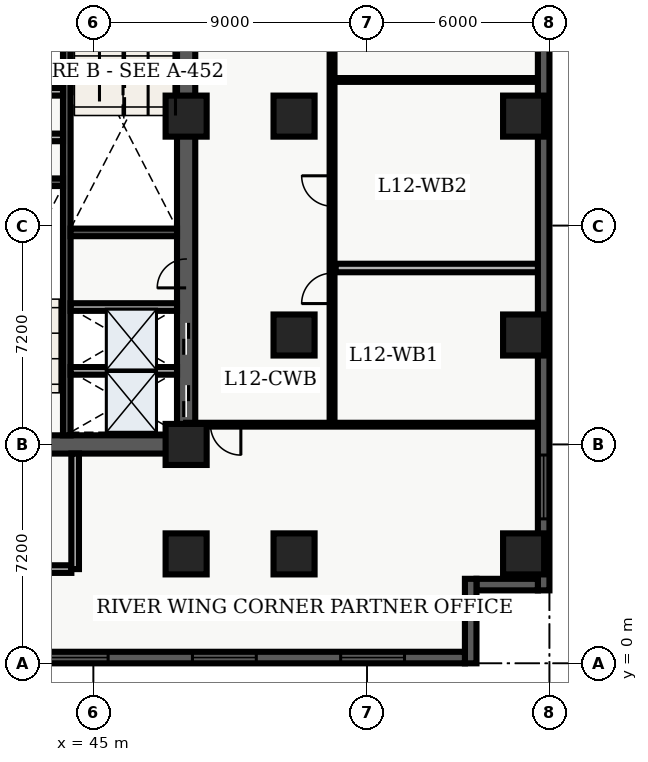
"""IFC4 building model, lengths in metres.
Left out: names, types, materials, properties, quantities, classifications, styles, units other than length and angle.
Written with IfcOpenShell. Run it as: python <this file> out.ifc"""

import sys

from ifc_helpers import new_model, entity, si_unit, converted_unit, direction, frame, origin_with_axes, origin_2d_with_axis, place, context, subcontext, project, spatial, polyline, rectangle, outline, extrude, element, fill, save


model = new_model("IFC4")
c1 = context("Model", 3, precision=1e-05, world=origin_with_axes(), true_north=direction((0.0, 1.0)))
c2 = subcontext(c1, "Body", "Model", "MODEL_VIEW")
j1 = project(units=[si_unit("LENGTHUNIT", "METRE"), converted_unit("PLANEANGLEUNIT", "DEGREE", entity("IfcPlaneAngleMeasure", 0.017), si_unit("PLANEANGLEUNIT", "RADIAN"), dimensions=[0, 0, 0, 0, 0, 0, 0])], contexts=[c1])
p1 = place(None, origin_with_axes())
s1 = spatial("IfcSite", under=j1, at=p1, CompositionType="ELEMENT")
p2 = place(p1, origin_with_axes())
s2 = spatial("IfcBuilding", under=s1, at=p2, CompositionType="ELEMENT")
p3 = place(p2, frame((0.0, 0.0, 52.2), z_axis=(0.0, 0.0, 1.0), x_axis=(1.0, 0.0, 0.0)))
s3 = spatial("IfcBuildingStorey", under=s2, at=p3, CompositionType="ELEMENT", Elevation=52.2)
p4 = place(p3, frame((40.2, 7.2, 0.0), z_axis=(0.0, 0.0, 1.0), x_axis=(1.0, 0.0, 0.0)))
e1 = element("IfcWall", 1, at=p4, inside=s3, PredefinedType="SHEAR", context=c2, shape_type="SweptSolid", body=[
    extrude(outline(polyline([(0.0, -0.3), (7.85, -0.3), (7.85, 0.3), (0.0, 0.3), (0.0, -0.3)])), origin_with_axes(), (0.0, 0.0, 1.0), 3.66),
])
p5 = place(p4, frame((2.175, 0.0, 0.0), z_axis=(0.0, 0.0, 1.0), x_axis=(1.0, 0.0, 0.0)))
e2 = element("IfcOpeningElement", 2, at=p5, cuts=e1, PredefinedType="OPENING", context=c2, shape_type="SweptSolid", body=[
    extrude(rectangle(XDim=1.05, YDim=0.62, at=origin_2d_with_axis()), origin_with_axes(), (0.0, 0.0, 1.0), 2.15),
])
p6 = place(p3, frame((48.05, 7.2, 0.0), z_axis=(0.0, 0.0, 1.0), x_axis=(0.0, 1.0, 0.0)))
e3 = element("IfcWall", 3, at=p6, inside=s3, PredefinedType="SHEAR", context=c2, shape_type="SweptSolid", body=[
    extrude(outline(polyline([(0.0, -0.3), (15.6, -0.3), (15.6, 0.3), (0.0, 0.3), (0.0, -0.3)])), origin_with_axes(), (0.0, 0.0, 1.0), 3.66),
])
p7 = place(p6, frame((1.425, 0.0, 0.0), z_axis=(0.0, 0.0, 1.0), x_axis=(1.0, 0.0, 0.0)))
e4 = element("IfcOpeningElement", 4, at=p7, cuts=e3, PredefinedType="OPENING", context=c2, shape_type="SweptSolid", body=[
    extrude(rectangle(XDim=1.05, YDim=0.62, at=origin_2d_with_axis()), origin_with_axes(), (0.0, 0.0, 1.0), 2.15),
])
p8 = place(p6, frame((3.475, 0.0, 0.0), z_axis=(0.0, 0.0, 1.0), x_axis=(1.0, 0.0, 0.0)))
e5 = element("IfcOpeningElement", 5, at=p8, cuts=e3, PredefinedType="OPENING", context=c2, shape_type="SweptSolid", body=[
    extrude(rectangle(XDim=1.05, YDim=0.62, at=origin_2d_with_axis()), origin_with_axes(), (0.0, 0.0, 1.0), 2.15),
])
p9 = place(p6, frame((5.625, 0.0, 0.0), z_axis=(0.0, 0.0, 1.0), x_axis=(1.0, 0.0, 0.0)))
e6 = element("IfcOpeningElement", 6, at=p9, cuts=e3, PredefinedType="OPENING", context=c2, shape_type="SweptSolid", body=[
    extrude(rectangle(XDim=0.95, YDim=0.62, at=origin_2d_with_axis()), origin_with_axes(), (0.0, 0.0, 1.0), 2.15),
])
p10 = place(p3, frame((44.125, 7.5, 0.0), z_axis=(0.0, 0.0, 1.0), x_axis=(0.0, 1.0, 0.0)))
e7 = element("IfcWall", 7, at=p10, inside=s3, PredefinedType="SHEAR", context=c2, shape_type="SweptSolid", body=[
    extrude(outline(polyline([(0.0, -0.125), (15.0, -0.125), (15.0, 0.125), (0.0, 0.125), (0.0, -0.125)])), origin_with_axes(), (0.0, 0.0, 1.0), 3.66),
])
for number, where, z_axis, x_axis in (
    (8, (40.5, 15.825, 0.0), (0.0, 0.0, 1.0), (1.0, 0.0, 0.0)),
    (9, (44.25, 14.175, 0.0), (0.0, 0.0, 1.0), (1.0, 0.0, 0.0)),
):
    element("IfcWall", number, at=place(p3, frame(where, z_axis=z_axis, x_axis=x_axis)), inside=s3, PredefinedType="SHEAR", context=c2, shape_type="SweptSolid", body=[
        extrude(outline(polyline([(0.0, -0.125), (3.5, -0.125), (3.5, 0.125), (0.0, 0.125), (0.0, -0.125)])), origin_with_axes(), (0.0, 0.0, 1.0), 3.66),
    ])
p11 = place(p3, frame((40.5, 17.3, 0.0), z_axis=(0.0, 0.0, 1.0), x_axis=(1.0, 0.0, 0.0)))
e10 = element("IfcWall", 10, at=p11, inside=s3, PredefinedType="SOLIDWALL", context=c2, shape_type="SweptSolid", body=[
    extrude(outline(polyline([(0.0, -0.125), (3.5, -0.125), (3.5, 0.125), (0.0, 0.125), (0.0, -0.125)])), origin_with_axes(), (0.0, 0.0, 1.0), 2.7),
])
p12 = place(p11, frame((2.4, 0.0, 0.0), z_axis=(0.0, 0.0, 1.0), x_axis=(1.0, 0.0, 0.0)))
e11 = element("IfcOpeningElement", 11, at=p12, cuts=e10, PredefinedType="OPENING", context=c2, shape_type="SweptSolid", body=[
    extrude(rectangle(XDim=0.9, YDim=0.27, at=origin_2d_with_axis()), origin_with_axes(), (0.0, 0.0, 1.0), 2.15),
])
p13 = place(p3, frame((40.5, 18.8, 0.0), z_axis=(0.0, 0.0, 1.0), x_axis=(1.0, 0.0, 0.0)))
e12 = element("IfcWall", 12, at=p13, inside=s3, PredefinedType="SOLIDWALL", context=c2, shape_type="SweptSolid", body=[
    extrude(outline(polyline([(0.0, -0.125), (3.5, -0.125), (3.5, 0.125), (0.0, 0.125), (0.0, -0.125)])), origin_with_axes(), (0.0, 0.0, 1.0), 2.7),
])
p14 = place(p3, frame((40.325, 3.1, 0.0), z_axis=(0.0, 0.0, 1.0), x_axis=(1.0, 0.0, 0.0)))
e13 = element("IfcWall", 13, at=p14, inside=s3, PredefinedType="SOLIDWALL", context=c2, shape_type="SweptSolid", body=[
    extrude(outline(polyline([(0.0, -0.125), (3.95, -0.125), (3.95, 0.125), (0.0, 0.125), (0.0, -0.125)])), origin_with_axes(), (0.0, 0.0, 1.0), 2.7),
])
p15 = place(p3, frame((44.4, 3.1, 0.0), z_axis=(0.0, 0.0, 1.0), x_axis=(0.0, 1.0, 0.0)))
e14 = element("IfcWall", 14, at=p15, inside=s3, PredefinedType="SOLIDWALL", context=c2, shape_type="SweptSolid", body=[
    extrude(outline(polyline([(0.0, -0.125), (3.8, -0.125), (3.8, 0.125), (0.0, 0.125), (0.0, -0.125)])), origin_with_axes(), (0.0, 0.0, 1.0), 2.7),
])
for number, where, z_axis, x_axis in (
    (15, (48.05, 3.6, 0.0), (0.0, 0.0, 1.0), (1.0, 0.0, 0.0)),
    (16, (48.05, 7.2, 0.0), (0.0, 0.0, 1.0), (1.0, 0.0, 0.0)),
    (17, (48.05, 18.0, 0.0), (0.0, 0.0, 1.0), (1.0, 0.0, 0.0)),
    (18, (51.6, 3.6, 0.0), (0.0, 0.0, 1.0), (1.0, 0.0, 0.0)),
    (19, (51.6, 10.8, 0.0), (0.0, 0.0, 1.0), (1.0, 0.0, 0.0)),
    (20, (51.6, 18.0, 0.0), (0.0, 0.0, 1.0), (1.0, 0.0, 0.0)),
    (21, (59.15, 3.6, 0.0), (0.0, 0.0, 1.0), (1.0, 0.0, 0.0)),
    (22, (59.15, 10.8, 0.0), (0.0, 0.0, 1.0), (1.0, 0.0, 0.0)),
    (23, (59.15, 18.0, 0.0), (0.0, 0.0, 1.0), (1.0, 0.0, 0.0)),
):
    element("IfcColumn", number, at=place(p3, frame(where, z_axis=z_axis, x_axis=x_axis)), inside=s3, PredefinedType="COLUMN", context=c2, shape_type="SweptSolid", body=[
        extrude(rectangle(XDim=1.35, YDim=1.35, at=origin_2d_with_axis()), origin_with_axes(), (0.0, 0.0, 1.0), 3.9),
    ])
for number, where, z_axis, x_axis in (
    (24, (44.25, 9.62, 0.0), (0.0, 0.0, 1.0), (1.0, 0.0, 0.0)),
    (25, (44.25, 11.72, 0.0), (0.0, 0.0, 1.0), (1.0, 0.0, 0.0)),
):
    element("IfcWall", number, at=place(p3, frame(where, z_axis=z_axis, x_axis=x_axis)), inside=s3, PredefinedType="SOLIDWALL", context=c2, shape_type="SweptSolid", body=[
        extrude(outline(polyline([(0.0, -0.125), (3.5, -0.125), (3.5, 0.125), (0.0, 0.125), (0.0, -0.125)])), origin_with_axes(), (0.0, 0.0, 1.0), 2.7),
    ])
p16 = place(p3, frame((52.85, 7.85, 0.0), z_axis=(0.0, 0.0, 1.0), x_axis=(0.0, 1.0, 0.0)))
e26 = element("IfcWall", 26, at=p16, inside=s3, PredefinedType="PARTITIONING", context=c2, shape_type="SweptSolid", body=[
    extrude(outline(polyline([(0.0, -0.08), (18.8, -0.08), (18.8, 0.08), (0.0, 0.08), (0.0, -0.08)])), origin_with_axes(), (0.0, 0.0, 1.0), 2.7),
])
p17 = place(p16, frame((4.484, 0.0, 0.0), z_axis=(0.0, 0.0, 1.0), x_axis=(1.0, 0.0, 0.0)))
e27 = element("IfcOpeningElement", 27, at=p17, cuts=e26, PredefinedType="OPENING", context=c2, shape_type="SweptSolid", body=[
    extrude(rectangle(XDim=1.0, YDim=0.18, at=origin_2d_with_axis()), origin_with_axes(), (0.0, 0.0, 1.0), 2.15),
])
p18 = place(p16, frame((7.687, 0.0, 0.0), z_axis=(0.0, 0.0, 1.0), x_axis=(1.0, 0.0, 0.0)))
e28 = element("IfcOpeningElement", 28, at=p18, cuts=e26, PredefinedType="OPENING", context=c2, shape_type="SweptSolid", body=[
    extrude(rectangle(XDim=1.0, YDim=0.18, at=origin_2d_with_axis()), origin_with_axes(), (0.0, 0.0, 1.0), 2.15),
])
p19 = place(p16, frame((13.79, 0.0, 0.0), z_axis=(0.0, 0.0, 1.0), x_axis=(1.0, 0.0, 0.0)))
e29 = element("IfcOpeningElement", 29, at=p19, cuts=e26, PredefinedType="OPENING", context=c2, shape_type="SweptSolid", body=[
    extrude(rectangle(XDim=1.0, YDim=0.18, at=origin_2d_with_axis()), origin_with_axes(), (0.0, 0.0, 1.0), 2.15),
])
p20 = place(p3, frame((59.64, 7.85, 0.0), z_axis=(0.0, 0.0, 1.0), x_axis=(-1.0, 0.0, 0.0)))
e30 = element("IfcWall", 30, at=p20, inside=s3, PredefinedType="PARTITIONING", context=c2, shape_type="SweptSolid", body=[
    extrude(outline(polyline([(0.0, -0.062), (11.59, -0.062), (11.59, 0.062), (0.0, 0.062), (0.0, -0.062)])), origin_with_axes(), (0.0, 0.0, 1.0), 2.7),
])
p21 = place(p20, frame((10.29, 0.0, 0.0), z_axis=(0.0, 0.0, 1.0), x_axis=(1.0, 0.0, 0.0)))
e31 = element("IfcOpeningElement", 31, at=p21, cuts=e30, PredefinedType="OPENING", context=c2, shape_type="SweptSolid", body=[
    extrude(rectangle(XDim=1.0, YDim=0.145, at=origin_2d_with_axis()), origin_with_axes(), (0.0, 0.0, 1.0), 2.15),
])
p22 = place(p3, frame((52.97, 13.004, 0.0), z_axis=(0.0, 0.0, 1.0), x_axis=(1.0, 0.0, 0.0)))
e32 = element("IfcWall", 32, at=p22, inside=s3, PredefinedType="PARTITIONING", context=c2, shape_type="SweptSolid", body=[
    extrude(outline(polyline([(0.0, -0.14), (6.655, -0.14), (6.655, 0.14), (0.0, 0.14), (0.0, -0.14)])), origin_with_axes(), (0.0, 0.0, 1.0), 2.7),
])
p23 = place(p3, frame((52.97, 19.189, 0.0), z_axis=(0.0, 0.0, 1.0), x_axis=(1.0, 0.0, 0.0)))
e33 = element("IfcWall", 33, at=p23, inside=s3, PredefinedType="PARTITIONING", context=c2, shape_type="SweptSolid", body=[
    extrude(outline(polyline([(0.0, -0.062), (6.655, -0.062), (6.655, 0.062), (0.0, 0.062), (0.0, -0.062)])), origin_with_axes(), (0.0, 0.0, 1.0), 2.7),
])
p24 = place(p3, frame((59.81, 26.02, 0.0), z_axis=(0.0, 0.0, 1.0), x_axis=(0.0, -1.0, 0.0)))
e34 = element("IfcWall", 34, at=p24, inside=s3, PredefinedType="SOLIDWALL", context=c2, shape_type="SweptSolid", body=[
    extrude(outline(polyline([(0.0, -0.19), (23.62, -0.19), (23.62, 0.19), (0.0, 0.19), (0.0, -0.19)])), origin_with_axes(), (0.0, 0.0, 1.0), 3.66),
])
p25 = place(p24, frame((3.853, 0.0, 0.45), z_axis=(0.0, 0.0, 1.0), x_axis=(1.0, 0.0, 0.0)))
e35 = element("IfcOpeningElement", 35, at=p25, cuts=e34, PredefinedType="OPENING", context=c2, shape_type="SweptSolid", body=[
    extrude(rectangle(XDim=2.1, YDim=0.4, at=origin_2d_with_axis()), origin_with_axes(), (0.0, 0.0, 1.0), 2.2),
])
p26 = place(p24, frame((20.218, 0.0, 0.45), z_axis=(0.0, 0.0, 1.0), x_axis=(1.0, 0.0, 0.0)))
e36 = element("IfcOpeningElement", 36, at=p26, cuts=e34, PredefinedType="OPENING", context=c2, shape_type="SweptSolid", body=[
    extrude(rectangle(XDim=2.1, YDim=0.4, at=origin_2d_with_axis()), origin_with_axes(), (0.0, 0.0, 1.0), 2.2),
])
p27 = place(p3, frame((59.62, 2.59, 0.0), z_axis=(0.0, 0.0, 1.0), x_axis=(-1.0, 0.0, 0.0)))
e37 = element("IfcWall", 37, at=p27, inside=s3, PredefinedType="SOLIDWALL", context=c2, shape_type="SweptSolid", body=[
    extrude(outline(polyline([(0.0, -0.19), (2.02, -0.19), (2.02, 0.19), (0.0, 0.19), (0.0, -0.19)])), origin_with_axes(), (0.0, 0.0, 1.0), 3.66),
])
p28 = place(p3, frame((57.41, 2.78, 0.0), z_axis=(0.0, 0.0, 1.0), x_axis=(0.0, -1.0, 0.0)))
e38 = element("IfcWall", 38, at=p28, inside=s3, PredefinedType="SOLIDWALL", context=c2, shape_type="SweptSolid", body=[
    extrude(outline(polyline([(0.0, -0.19), (2.78, -0.19), (2.78, 0.19), (0.0, 0.19), (0.0, -0.19)])), origin_with_axes(), (0.0, 0.0, 1.0), 3.66),
])
p29 = place(p3, frame((57.22, 0.19, 0.0), z_axis=(0.0, 0.0, 1.0), x_axis=(-1.0, 0.0, 0.0)))
e39 = element("IfcWall", 39, at=p29, inside=s3, PredefinedType="SOLIDWALL", context=c2, shape_type="SweptSolid", body=[
    extrude(outline(polyline([(0.0, -0.19), (54.82, -0.19), (54.82, 0.19), (0.0, 0.19), (0.0, -0.19)])), origin_with_axes(), (0.0, 0.0, 1.0), 3.66),
])
p30 = place(p29, frame((3.037, 0.0, 0.45), z_axis=(0.0, 0.0, 1.0), x_axis=(1.0, 0.0, 0.0)))
e40 = element("IfcOpeningElement", 40, at=p30, cuts=e39, PredefinedType="OPENING", context=c2, shape_type="SweptSolid", body=[
    extrude(rectangle(XDim=2.1, YDim=0.4, at=origin_2d_with_axis()), origin_with_axes(), (0.0, 0.0, 1.0), 2.2),
])
p31 = place(p29, frame((7.912, 0.0, 0.45), z_axis=(0.0, 0.0, 1.0), x_axis=(1.0, 0.0, 0.0)))
e41 = element("IfcOpeningElement", 41, at=p31, cuts=e39, PredefinedType="OPENING", context=c2, shape_type="SweptSolid", body=[
    extrude(rectangle(XDim=2.1, YDim=0.4, at=origin_2d_with_axis()), origin_with_axes(), (0.0, 0.0, 1.0), 2.2),
])
p32 = place(p29, frame((12.786, 0.0, 0.45), z_axis=(0.0, 0.0, 1.0), x_axis=(1.0, 0.0, 0.0)))
e42 = element("IfcOpeningElement", 42, at=p32, cuts=e39, PredefinedType="OPENING", context=c2, shape_type="SweptSolid", body=[
    extrude(rectangle(XDim=2.1, YDim=0.4, at=origin_2d_with_axis()), origin_with_axes(), (0.0, 0.0, 1.0), 2.2),
])
p33 = place(p29, frame((17.661, 0.0, 0.45), z_axis=(0.0, 0.0, 1.0), x_axis=(1.0, 0.0, 0.0)))
e43 = element("IfcOpeningElement", 43, at=p33, cuts=e39, PredefinedType="OPENING", context=c2, shape_type="SweptSolid", body=[
    extrude(rectangle(XDim=2.1, YDim=0.4, at=origin_2d_with_axis()), origin_with_axes(), (0.0, 0.0, 1.0), 2.2),
])
p34 = place(p29, frame((22.535, 0.0, 0.45), z_axis=(0.0, 0.0, 1.0), x_axis=(1.0, 0.0, 0.0)))
e44 = element("IfcOpeningElement", 44, at=p34, cuts=e39, PredefinedType="OPENING", context=c2, shape_type="SweptSolid", body=[
    extrude(rectangle(XDim=2.1, YDim=0.4, at=origin_2d_with_axis()), origin_with_axes(), (0.0, 0.0, 1.0), 2.2),
])
p35 = place(p29, frame((27.41, 0.0, 0.45), z_axis=(0.0, 0.0, 1.0), x_axis=(1.0, 0.0, 0.0)))
e45 = element("IfcOpeningElement", 45, at=p35, cuts=e39, PredefinedType="OPENING", context=c2, shape_type="SweptSolid", body=[
    extrude(rectangle(XDim=2.1, YDim=0.4, at=origin_2d_with_axis()), origin_with_axes(), (0.0, 0.0, 1.0), 2.2),
])
p36 = place(p29, frame((32.285, 0.0, 0.45), z_axis=(0.0, 0.0, 1.0), x_axis=(1.0, 0.0, 0.0)))
e46 = element("IfcOpeningElement", 46, at=p36, cuts=e39, PredefinedType="OPENING", context=c2, shape_type="SweptSolid", body=[
    extrude(rectangle(XDim=2.1, YDim=0.4, at=origin_2d_with_axis()), origin_with_axes(), (0.0, 0.0, 1.0), 2.2),
])
p37 = place(p29, frame((37.159, 0.0, 0.45), z_axis=(0.0, 0.0, 1.0), x_axis=(1.0, 0.0, 0.0)))
e47 = element("IfcOpeningElement", 47, at=p37, cuts=e39, PredefinedType="OPENING", context=c2, shape_type="SweptSolid", body=[
    extrude(rectangle(XDim=2.1, YDim=0.4, at=origin_2d_with_axis()), origin_with_axes(), (0.0, 0.0, 1.0), 2.2),
])
p38 = place(p29, frame((46.908, 0.0, 0.45), z_axis=(0.0, 0.0, 1.0), x_axis=(1.0, 0.0, 0.0)))
e48 = element("IfcOpeningElement", 48, at=p38, cuts=e39, PredefinedType="OPENING", context=c2, shape_type="SweptSolid", body=[
    extrude(rectangle(XDim=2.1, YDim=0.4, at=origin_2d_with_axis()), origin_with_axes(), (0.0, 0.0, 1.0), 2.2),
])
p39 = place(p29, frame((51.783, 0.0, 0.45), z_axis=(0.0, 0.0, 1.0), x_axis=(1.0, 0.0, 0.0)))
e49 = element("IfcOpeningElement", 49, at=p39, cuts=e39, PredefinedType="OPENING", context=c2, shape_type="SweptSolid", body=[
    extrude(rectangle(XDim=2.1, YDim=0.4, at=origin_2d_with_axis()), origin_with_axes(), (0.0, 0.0, 1.0), 2.2),
])
p40 = place(p6, frame((1.425, 0.0, 0.0), z_axis=(0.0, 0.0, 1.0), x_axis=(1.0, 0.0, 0.0)))
e50 = element("IfcDoor", 50, at=p40, inside=s3, OperationType="SLIDING_TO_LEFT", PredefinedType="DOOR", context=c2, shape_type="SweptSolid", body=[
    extrude(rectangle(XDim=1.05, YDim=0.09, at=origin_2d_with_axis()), origin_with_axes(), (0.0, 0.0, 1.0), 2.15),
])
fill(e4, e50)
p41 = place(p6, frame((3.475, 0.0, 0.0), z_axis=(0.0, 0.0, 1.0), x_axis=(1.0, 0.0, 0.0)))
e51 = element("IfcDoor", 51, at=p41, inside=s3, OperationType="SLIDING_TO_RIGHT", PredefinedType="DOOR", context=c2, shape_type="SweptSolid", body=[
    extrude(rectangle(XDim=1.05, YDim=0.09, at=origin_2d_with_axis()), origin_with_axes(), (0.0, 0.0, 1.0), 2.15),
])
fill(e5, e51)
p42 = place(p6, frame((5.625, 0.0, 0.0), z_axis=(0.0, 0.0, 1.0), x_axis=(1.0, 0.0, 0.0)))
e52 = element("IfcDoor", 52, at=p42, inside=s3, OperationType="SINGLE_SWING_LEFT", PredefinedType="DOOR", context=c2, shape_type="SweptSolid", body=[
    extrude(rectangle(XDim=0.95, YDim=0.09, at=origin_2d_with_axis()), origin_with_axes(), (0.0, 0.0, 1.0), 2.15),
])
fill(e6, e52)
p43 = place(p20, frame((10.29, 0.0, 0.0), z_axis=(0.0, 0.0, 1.0), x_axis=(1.0, 0.0, 0.0)))
e53 = element("IfcDoor", 53, at=p43, inside=s3, OperationType="SINGLE_SWING_LEFT", PredefinedType="DOOR", context=c2, shape_type="SweptSolid", body=[
    extrude(rectangle(XDim=1.0, YDim=0.075, at=origin_2d_with_axis()), origin_with_axes(), (0.0, 0.0, 1.0), 2.15),
])
fill(e31, e53)
p44 = place(p16, frame((4.484, 0.0, 0.0), z_axis=(0.0, 0.0, 1.0), x_axis=(1.0, 0.0, 0.0)))
e54 = element("IfcDoor", 54, at=p44, inside=s3, OperationType="SINGLE_SWING_LEFT", PredefinedType="DOOR", context=c2, shape_type="SweptSolid", body=[
    extrude(rectangle(XDim=1.0, YDim=0.09, at=origin_2d_with_axis()), origin_with_axes(), (0.0, 0.0, 1.0), 2.15),
])
fill(e27, e54)
p45 = place(p16, frame((7.687, 0.0, 0.0), z_axis=(0.0, 0.0, 1.0), x_axis=(1.0, 0.0, 0.0)))
e55 = element("IfcDoor", 55, at=p45, inside=s3, OperationType="SINGLE_SWING_RIGHT", PredefinedType="DOOR", context=c2, shape_type="SweptSolid", body=[
    extrude(rectangle(XDim=1.0, YDim=0.09, at=origin_2d_with_axis()), origin_with_axes(), (0.0, 0.0, 1.0), 2.15),
])
fill(e28, e55)
p46 = place(p24, frame((20.218, 0.0, 0.45), z_axis=(0.0, 0.0, 1.0), x_axis=(1.0, 0.0, 0.0)))
e56 = element("IfcWindow", 56, at=p46, inside=s3, PredefinedType="WINDOW", context=c2, shape_type="SweptSolid", body=[
    extrude(rectangle(XDim=2.1, YDim=0.09, at=origin_2d_with_axis()), origin_with_axes(), (0.0, 0.0, 1.0), 2.2),
])
fill(e36, e56)
p47 = place(p29, frame((3.037, 0.0, 0.45), z_axis=(0.0, 0.0, 1.0), x_axis=(1.0, 0.0, 0.0)))
e57 = element("IfcWindow", 57, at=p47, inside=s3, PredefinedType="WINDOW", context=c2, shape_type="SweptSolid", body=[
    extrude(rectangle(XDim=2.1, YDim=0.09, at=origin_2d_with_axis()), origin_with_axes(), (0.0, 0.0, 1.0), 2.2),
])
fill(e40, e57)
p48 = place(p29, frame((7.912, 0.0, 0.45), z_axis=(0.0, 0.0, 1.0), x_axis=(1.0, 0.0, 0.0)))
e58 = element("IfcWindow", 58, at=p48, inside=s3, PredefinedType="WINDOW", context=c2, shape_type="SweptSolid", body=[
    extrude(rectangle(XDim=2.1, YDim=0.09, at=origin_2d_with_axis()), origin_with_axes(), (0.0, 0.0, 1.0), 2.2),
])
fill(e41, e58)
p49 = place(p29, frame((12.786, 0.0, 0.45), z_axis=(0.0, 0.0, 1.0), x_axis=(1.0, 0.0, 0.0)))
e59 = element("IfcWindow", 59, at=p49, inside=s3, PredefinedType="WINDOW", context=c2, shape_type="SweptSolid", body=[
    extrude(rectangle(XDim=2.1, YDim=0.09, at=origin_2d_with_axis()), origin_with_axes(), (0.0, 0.0, 1.0), 2.2),
])
fill(e42, e59)
save(model, sys.argv[1])
